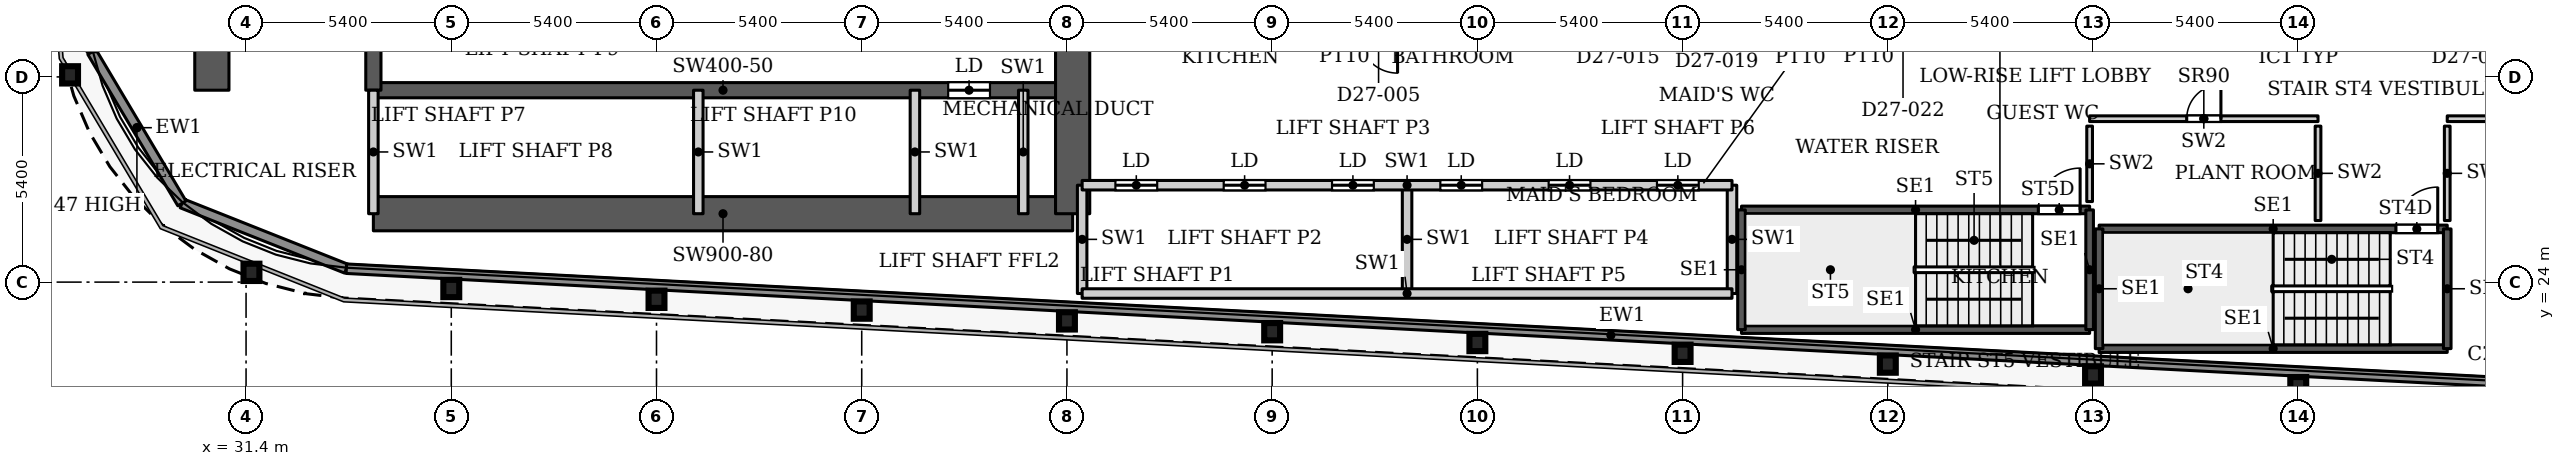
"""IFC4 building model, lengths in metres.
Left out: names, types, materials, properties, quantities, classifications, styles, units other than length and angle.
Written with IfcOpenShell. Run it as: python <this file> out.ifc"""

import sys

from ifc_helpers import new_model, si_unit, direction, frame, frame_2d, origin, origin_2d, place, context, subcontext, project, spatial, rectangle, i_section, extrude, source, transform, mapped, element, fill, save


model = new_model("IFC4")
c1 = context("Model", 3, precision=1e-05, world=origin(), true_north=direction((0.0, 1.0)))
c2 = subcontext(c1, "Body", "Model", "MODEL_VIEW")
j1 = project(units=[si_unit("LENGTHUNIT", "METRE"), si_unit("PLANEANGLEUNIT", "RADIAN")], contexts=[c1])
p1 = place(None, origin())
s1 = spatial("IfcSite", under=j1, at=p1, CompositionType="ELEMENT")
p2 = place(p1, origin())
s2 = spatial("IfcBuilding", under=s1, at=p2, CompositionType="ELEMENT")
p3 = place(p2, frame((0.0, 0.0, 121.4)))
s3 = spatial("IfcBuildingStorey", under=s2, at=p3, CompositionType="ELEMENT", Elevation=121.4)
for number, where, z_axis, x_axis in (
    (1, (85.4, 21.274, 0.0), (0.0, 0.0, 1.0), (1.0, 0.0, 0.0)),
    (2, (80.0, 21.558, 0.0), (0.0, 0.0, 1.0), (1.0, 0.0, 0.0)),
    (3, (74.6, 21.843, 0.0), (0.0, 0.0, 1.0), (1.0, 0.0, 0.0)),
    (4, (69.2, 22.127, 0.0), (0.0, 0.0, 1.0), (1.0, 0.0, 0.0)),
    (5, (63.8, 22.411, 0.0), (0.0, 0.0, 1.0), (1.0, 0.0, 0.0)),
    (6, (58.4, 22.695, 0.0), (0.0, 0.0, 1.0), (1.0, 0.0, 0.0)),
    (7, (53.0, 22.98, 0.0), (0.0, 0.0, 1.0), (1.0, 0.0, 0.0)),
    (8, (47.6, 23.264, 0.0), (0.0, 0.0, 1.0), (1.0, 0.0, 0.0)),
    (9, (42.2, 23.548, 0.0), (0.0, 0.0, 1.0), (1.0, 0.0, 0.0)),
    (10, (36.8, 23.832, 0.0), (0.0, 0.0, 1.0), (1.0, 0.0, 0.0)),
    (11, (31.542, 24.257, 0.0), (0.0, 0.0, 1.0), (1.0, 0.0, 0.0)),
    (12, (26.769, 29.454, 0.0), (0.0, 0.0, 1.0), (1.0, 0.0, 0.0)),
):
    element("IfcColumn", number, at=place(p3, frame(where, z_axis=z_axis, x_axis=x_axis)), inside=s3, PredefinedType="COLUMN", context=c2, shape_type="SweptSolid", body=[
        extrude(i_section(OverallWidth=0.418, OverallDepth=0.455, WebThickness=0.042, FlangeThickness=0.068, FilletRadius=0.014, at=origin_2d()), origin(), (0.0, 0.0, 1.0), 3.9),
    ])
p4 = place(p3, frame((34.75, 25.8, 0.0), z_axis=(0.0, 0.0, 1.0), x_axis=(1.0, 0.0, 0.0)))
e13 = element("IfcWall", 13, at=p4, inside=s3, PredefinedType="SHEAR", context=c2, shape_type="SweptSolid", body=[
    extrude(rectangle(XDim=18.4, YDim=0.9, at=frame_2d((9.2, 0.0))), origin(), (0.0, 0.0, 1.0), 3.9),
])
p5 = place(p3, frame((34.75, 29.05, 0.0), z_axis=(0.0, 0.0, 1.0), x_axis=(1.0, 0.0, 0.0)))
e14 = element("IfcWall", 14, at=p5, inside=s3, PredefinedType="SHEAR", context=c2, shape_type="SweptSolid", body=[
    extrude(rectangle(XDim=18.4, YDim=0.4, at=frame_2d((9.2, 0.0))), origin(), (0.0, 0.0, 1.0), 3.9),
])
p6 = place(p5, frame((15.125, 0.0, 0.0)))
e15 = element("IfcOpeningElement", 15, at=p6, cuts=e14, PredefinedType="OPENING", context=c2, shape_type="SweptSolid", body=[
    extrude(rectangle(XDim=1.1, YDim=2.2, at=frame_2d((0.55, 1.1))), frame((0.0, 0.21, 0.0), z_axis=(0.0, -1.0, 0.0), x_axis=(1.0, 0.0, 0.0)), (0.0, 0.0, 1.0), 0.42),
])
p7 = place(p3, frame((34.75, 29.05, 0.0), z_axis=(0.0, 0.0, 1.0), x_axis=(0.0, 1.0, 0.0)))
e16 = element("IfcWall", 16, at=p7, inside=s3, PredefinedType="SHEAR", context=c2, shape_type="SweptSolid", body=[
    extrude(rectangle(XDim=18.45, YDim=0.4, at=frame_2d((9.225, 0.0))), origin(), (0.0, 0.0, 1.0), 3.9),
])
p8 = place(p7, frame((8.025, 0.0, 0.0)))
e17 = element("IfcOpeningElement", 17, at=p8, cuts=e16, PredefinedType="OPENING", context=c2, shape_type="SweptSolid", body=[
    extrude(rectangle(XDim=1.1, YDim=2.2, at=frame_2d((0.55, 1.1))), frame((0.0, 0.21, 0.0), z_axis=(0.0, -1.0, 0.0), x_axis=(1.0, 0.0, 0.0)), (0.0, 0.0, 1.0), 0.42),
])
p9 = place(p7, frame((10.875, 0.0, 0.0)))
e18 = element("IfcOpeningElement", 18, at=p9, cuts=e16, PredefinedType="OPENING", context=c2, shape_type="SweptSolid", body=[
    extrude(rectangle(XDim=1.1, YDim=2.2, at=frame_2d((0.55, 1.1))), frame((0.0, 0.21, 0.0), z_axis=(0.0, -1.0, 0.0), x_axis=(1.0, 0.0, 0.0)), (0.0, 0.0, 1.0), 0.42),
])
p10 = place(p7, frame((13.725, 0.0, 0.0)))
e19 = element("IfcOpeningElement", 19, at=p10, cuts=e16, PredefinedType="OPENING", context=c2, shape_type="SweptSolid", body=[
    extrude(rectangle(XDim=1.1, YDim=2.2, at=frame_2d((0.55, 1.1))), frame((0.0, 0.21, 0.0), z_axis=(0.0, -1.0, 0.0), x_axis=(1.0, 0.0, 0.0)), (0.0, 0.0, 1.0), 0.42),
])
p11 = place(p7, frame((15.95, 0.0, 0.0)))
e20 = element("IfcOpeningElement", 20, at=p11, cuts=e16, PredefinedType="OPENING", context=c2, shape_type="SweptSolid", body=[
    extrude(rectangle(XDim=1.1, YDim=2.2, at=frame_2d((0.55, 1.1))), frame((0.0, 0.21, 0.0), z_axis=(0.0, -1.0, 0.0), x_axis=(1.0, 0.0, 0.0)), (0.0, 0.0, 1.0), 0.42),
])
p12 = place(p3, frame((30.5, 29.05, 0.0), z_axis=(0.0, 0.0, 1.0), x_axis=(0.0, 1.0, 0.0)))
e21 = element("IfcWall", 21, at=p12, inside=s3, PredefinedType="SHEAR", context=c2, shape_type="SweptSolid", body=[
    extrude(rectangle(XDim=18.45, YDim=0.9, at=frame_2d((9.225, 0.0))), origin(), (0.0, 0.0, 1.0), 3.9),
])
p13 = place(p12, frame((6.55, 0.0, 0.0)))
e22 = element("IfcOpeningElement", 22, at=p13, cuts=e21, PredefinedType="OPENING", context=c2, shape_type="SweptSolid", body=[
    extrude(rectangle(XDim=0.9, YDim=2.2, at=frame_2d((0.45, 1.1))), frame((0.0, 0.46, 0.0), z_axis=(0.0, -1.0, 0.0), x_axis=(1.0, 0.0, 0.0)), (0.0, 0.0, 1.0), 0.92),
])
p14 = place(p12, frame((11.025, 0.0, 0.0)))
e23 = element("IfcOpeningElement", 23, at=p14, cuts=e21, PredefinedType="OPENING", context=c2, shape_type="SweptSolid", body=[
    extrude(rectangle(XDim=0.9, YDim=2.2, at=frame_2d((0.45, 1.1))), frame((0.0, 0.46, 0.0), z_axis=(0.0, -1.0, 0.0), x_axis=(1.0, 0.0, 0.0)), (0.0, 0.0, 1.0), 0.92),
])
p15 = place(p3, frame((53.15, 25.8, 0.0), z_axis=(0.0, 0.0, 1.0), x_axis=(0.0, 1.0, 0.0)))
e24 = element("IfcWall", 24, at=p15, inside=s3, PredefinedType="SHEAR", context=c2, shape_type="SweptSolid", body=[
    extrude(rectangle(XDim=10.4, YDim=0.9, at=frame_2d((5.2, 0.0))), origin(), (0.0, 0.0, 1.0), 3.9),
])
p16 = place(p3, frame((34.039, 24.353, 0.0), z_axis=(0.0, 0.0, 1.0), x_axis=(-0.929352825399, 0.369192803184, 0.0)))
e25 = element("IfcWall", 25, at=p16, inside=s3, PredefinedType="SOLIDWALL", context=c2, shape_type="SweptSolid", body=[
    extrude(rectangle(XDim=4.656, YDim=0.25, at=frame_2d((2.328, 0.0))), origin(), (0.0, 0.0, 1.0), 3.75),
])
p17 = place(p3, frame((29.712, 26.072, 0.0), z_axis=(0.0, 0.0, 1.0), x_axis=(-0.511028049012, 0.859564036662, 0.0)))
e26 = element("IfcWall", 26, at=p17, inside=s3, PredefinedType="SOLIDWALL", context=c2, shape_type="SweptSolid", body=[
    extrude(rectangle(XDim=4.634, YDim=0.25, at=frame_2d((2.317, 0.0))), origin(), (0.0, 0.0, 1.0), 3.147),
])
p18 = place(p3, frame((27.344, 30.055, 0.0), z_axis=(0.0, 0.0, 1.0), x_axis=(-0.077571675317, 0.99698677784, 0.0)))
e27 = element("IfcWall", 27, at=p18, inside=s3, PredefinedType="SOLIDWALL", context=c2, shape_type="SweptSolid", body=[
    extrude(rectangle(XDim=1.92, YDim=0.25, at=frame_2d((0.96, 0.0))), origin(), (0.0, 0.0, 1.0), 3.75),
])
p19 = place(p3, frame((100.586, 20.85, 0.0), z_axis=(0.0, 0.0, 1.0), x_axis=(-0.99861746497, 0.052565755559, 0.0)))
e28 = element("IfcWall", 28, at=p19, inside=s3, PredefinedType="SOLIDWALL", context=c2, shape_type="SweptSolid", body=[
    extrude(rectangle(XDim=66.639, YDim=0.25, at=frame_2d((33.319, 0.0))), origin(), (0.0, 0.0, 1.0), 3.75),
])
p20 = place(p3, frame((80.16, 22.25, 0.0), z_axis=(0.0, 0.0, 1.0), x_axis=(1.0, 0.0, 0.0)))
e29 = element("IfcWall", 29, at=p20, inside=s3, PredefinedType="SHEAR", context=c2, shape_type="SweptSolid", body=[
    extrude(rectangle(XDim=9.16, YDim=0.2, at=frame_2d((4.58, 0.0))), origin(), (0.0, 0.0, 1.0), 3.9),
])
p21 = place(p3, frame((80.16, 25.4, 0.0), z_axis=(0.0, 0.0, 1.0), x_axis=(1.0, 0.0, 0.0)))
e30 = element("IfcWall", 30, at=p21, inside=s3, PredefinedType="SHEAR", context=c2, shape_type="SweptSolid", body=[
    extrude(rectangle(XDim=9.16, YDim=0.2, at=frame_2d((4.58, 0.0))), origin(), (0.0, 0.0, 1.0), 3.9),
])
p22 = place(p21, frame((7.81, 0.0, 0.0)))
e31 = element("IfcOpeningElement", 31, at=p22, cuts=e30, PredefinedType="OPENING", context=c2, shape_type="SweptSolid", body=[
    extrude(rectangle(XDim=1.1, YDim=2.2, at=frame_2d((0.55, 1.1))), frame((0.0, 0.11, 0.0), z_axis=(0.0, -1.0, 0.0), x_axis=(1.0, 0.0, 0.0)), (0.0, 0.0, 1.0), 0.22),
])
for number, where, z_axis, x_axis in (
    (32, (80.16, 22.25, 0.0), (0.0, 0.0, 1.0), (0.0, 1.0, 0.0)),
    (33, (89.32, 22.25, 0.0), (0.0, 0.0, 1.0), (0.0, 1.0, 0.0)),
):
    element("IfcWall", number, at=place(p3, frame(where, z_axis=z_axis, x_axis=x_axis)), inside=s3, PredefinedType="SHEAR", context=c2, shape_type="SweptSolid", body=[
        extrude(rectangle(XDim=3.15, YDim=0.2, at=frame_2d((1.575, 0.0))), origin(), (0.0, 0.0, 1.0), 3.9),
    ])
p23 = place(p3, frame((70.75, 22.75, 0.0), z_axis=(0.0, 0.0, 1.0), x_axis=(1.0, 0.0, 0.0)))
e34 = element("IfcWall", 34, at=p23, inside=s3, PredefinedType="SHEAR", context=c2, shape_type="SweptSolid", body=[
    extrude(rectangle(XDim=9.16, YDim=0.2, at=frame_2d((4.58, 0.0))), origin(), (0.0, 0.0, 1.0), 3.9),
])
p24 = place(p3, frame((70.75, 25.9, 0.0), z_axis=(0.0, 0.0, 1.0), x_axis=(1.0, 0.0, 0.0)))
e35 = element("IfcWall", 35, at=p24, inside=s3, PredefinedType="SHEAR", context=c2, shape_type="SweptSolid", body=[
    extrude(rectangle(XDim=9.16, YDim=0.2, at=frame_2d((4.58, 0.0))), origin(), (0.0, 0.0, 1.0), 3.9),
])
p25 = place(p24, frame((7.81, 0.0, 0.0)))
e36 = element("IfcOpeningElement", 36, at=p25, cuts=e35, PredefinedType="OPENING", context=c2, shape_type="SweptSolid", body=[
    extrude(rectangle(XDim=1.1, YDim=2.2, at=frame_2d((0.55, 1.1))), frame((0.0, 0.11, 0.0), z_axis=(0.0, -1.0, 0.0), x_axis=(1.0, 0.0, 0.0)), (0.0, 0.0, 1.0), 0.22),
])
for number, where, z_axis, x_axis in (
    (37, (70.75, 22.75, 0.0), (0.0, 0.0, 1.0), (0.0, 1.0, 0.0)),
    (38, (79.91, 22.75, 0.0), (0.0, 0.0, 1.0), (0.0, 1.0, 0.0)),
):
    element("IfcWall", number, at=place(p3, frame(where, z_axis=z_axis, x_axis=x_axis)), inside=s3, PredefinedType="SHEAR", context=c2, shape_type="SweptSolid", body=[
        extrude(rectangle(XDim=3.15, YDim=0.2, at=frame_2d((1.575, 0.0))), origin(), (0.0, 0.0, 1.0), 3.9),
    ])
for number, where, z_axis, x_axis in (
    (39, (34.75, 25.8, 0.0), (0.0, 0.0, 1.0), (0.0, 1.0, 0.0)),
    (40, (43.3, 25.8, 0.0), (0.0, 0.0, 1.0), (0.0, 1.0, 0.0)),
    (41, (49.0, 25.8, 0.0), (0.0, 0.0, 1.0), (0.0, 1.0, 0.0)),
    (42, (51.85, 25.8, 0.0), (0.0, 0.0, 1.0), (0.0, 1.0, 0.0)),
):
    element("IfcWall", number, at=place(p3, frame(where, z_axis=z_axis, x_axis=x_axis)), inside=s3, PredefinedType="PARTITIONING", context=c2, shape_type="SweptSolid", body=[
        extrude(rectangle(XDim=3.25, YDim=0.25, at=frame_2d((1.625, 0.0))), origin(), (0.0, 0.0, 1.0), 3.9),
    ])
for number, where, z_axis, x_axis in (
    (43, (53.4, 23.7, 0.0), (0.0, 0.0, 1.0), (0.0, 1.0, 0.0)),
    (44, (61.95, 23.7, 0.0), (0.0, 0.0, 1.0), (0.0, 1.0, 0.0)),
    (45, (70.5, 23.7, 0.0), (0.0, 0.0, 1.0), (0.0, 1.0, 0.0)),
):
    element("IfcWall", number, at=place(p3, frame(where, z_axis=z_axis, x_axis=x_axis)), inside=s3, PredefinedType="PARTITIONING", context=c2, shape_type="SweptSolid", body=[
        extrude(rectangle(XDim=2.85, YDim=0.25, at=frame_2d((1.425, 0.0))), origin(), (0.0, 0.0, 1.0), 3.9),
    ])
p26 = place(p3, frame((53.4, 23.7, 0.0), z_axis=(0.0, 0.0, 1.0), x_axis=(1.0, 0.0, 0.0)))
e46 = element("IfcWall", 46, at=p26, inside=s3, PredefinedType="PARTITIONING", context=c2, shape_type="SweptSolid", body=[
    extrude(rectangle(XDim=17.1, YDim=0.25, at=frame_2d((8.55, 0.0))), origin(), (0.0, 0.0, 1.0), 3.9),
])
p27 = place(p3, frame((53.4, 26.55, 0.0), z_axis=(0.0, 0.0, 1.0), x_axis=(1.0, 0.0, 0.0)))
e47 = element("IfcWall", 47, at=p27, inside=s3, PredefinedType="PARTITIONING", context=c2, shape_type="SweptSolid", body=[
    extrude(rectangle(XDim=17.1, YDim=0.25, at=frame_2d((8.55, 0.0))), origin(), (0.0, 0.0, 1.0), 3.9),
])
p28 = place(p27, frame((0.875, 0.0, 0.0)))
e48 = element("IfcOpeningElement", 48, at=p28, cuts=e47, PredefinedType="OPENING", context=c2, shape_type="SweptSolid", body=[
    extrude(rectangle(XDim=1.1, YDim=2.2, at=frame_2d((0.55, 1.1))), frame((0.0, 0.135, 0.0), z_axis=(0.0, -1.0, 0.0), x_axis=(1.0, 0.0, 0.0)), (0.0, 0.0, 1.0), 0.27),
])
p29 = place(p27, frame((3.725, 0.0, 0.0)))
e49 = element("IfcOpeningElement", 49, at=p29, cuts=e47, PredefinedType="OPENING", context=c2, shape_type="SweptSolid", body=[
    extrude(rectangle(XDim=1.1, YDim=2.2, at=frame_2d((0.55, 1.1))), frame((0.0, 0.135, 0.0), z_axis=(0.0, -1.0, 0.0), x_axis=(1.0, 0.0, 0.0)), (0.0, 0.0, 1.0), 0.27),
])
p30 = place(p27, frame((6.575, 0.0, 0.0)))
e50 = element("IfcOpeningElement", 50, at=p30, cuts=e47, PredefinedType="OPENING", context=c2, shape_type="SweptSolid", body=[
    extrude(rectangle(XDim=1.1, YDim=2.2, at=frame_2d((0.55, 1.1))), frame((0.0, 0.135, 0.0), z_axis=(0.0, -1.0, 0.0), x_axis=(1.0, 0.0, 0.0)), (0.0, 0.0, 1.0), 0.27),
])
p31 = place(p27, frame((9.425, 0.0, 0.0)))
e51 = element("IfcOpeningElement", 51, at=p31, cuts=e47, PredefinedType="OPENING", context=c2, shape_type="SweptSolid", body=[
    extrude(rectangle(XDim=1.1, YDim=2.2, at=frame_2d((0.55, 1.1))), frame((0.0, 0.135, 0.0), z_axis=(0.0, -1.0, 0.0), x_axis=(1.0, 0.0, 0.0)), (0.0, 0.0, 1.0), 0.27),
])
p32 = place(p27, frame((12.275, 0.0, 0.0)))
e52 = element("IfcOpeningElement", 52, at=p32, cuts=e47, PredefinedType="OPENING", context=c2, shape_type="SweptSolid", body=[
    extrude(rectangle(XDim=1.1, YDim=2.2, at=frame_2d((0.55, 1.1))), frame((0.0, 0.135, 0.0), z_axis=(0.0, -1.0, 0.0), x_axis=(1.0, 0.0, 0.0)), (0.0, 0.0, 1.0), 0.27),
])
p33 = place(p27, frame((15.125, 0.0, 0.0)))
e53 = element("IfcOpeningElement", 53, at=p33, cuts=e47, PredefinedType="OPENING", context=c2, shape_type="SweptSolid", body=[
    extrude(rectangle(XDim=1.1, YDim=2.2, at=frame_2d((0.55, 1.1))), frame((0.0, 0.135, 0.0), z_axis=(0.0, -1.0, 0.0), x_axis=(1.0, 0.0, 0.0)), (0.0, 0.0, 1.0), 0.27),
])
p34 = place(p3, frame((79.91, 28.3, 0.0), z_axis=(0.0, 0.0, 1.0), x_axis=(1.0, 0.0, 0.0)))
e54 = element("IfcWall", 54, at=p34, inside=s3, PredefinedType="PARTITIONING", context=c2, shape_type="SweptSolid", body=[
    extrude(rectangle(XDim=6.01, YDim=0.15, at=frame_2d((3.005, 0.0))), origin(), (0.0, 0.0, 1.0), 3.9),
])
p35 = place(p34, frame((2.555, 0.0, 0.0)))
e55 = element("IfcOpeningElement", 55, at=p35, cuts=e54, PredefinedType="OPENING", context=c2, shape_type="SweptSolid", body=[
    extrude(rectangle(XDim=0.9, YDim=2.2, at=frame_2d((0.45, 1.1))), frame((0.0, 0.085, 0.0), z_axis=(0.0, -1.0, 0.0), x_axis=(1.0, 0.0, 0.0)), (0.0, 0.0, 1.0), 0.17),
])
p36 = place(p3, frame((79.91, 26.12, 0.0), z_axis=(0.0, 0.0, 1.0), x_axis=(0.0, 1.0, 0.0)))
e56 = element("IfcWall", 56, at=p36, inside=s3, PredefinedType="PARTITIONING", context=c2, shape_type="SweptSolid", body=[
    extrude(rectangle(XDim=1.985, YDim=0.15, at=frame_2d((0.992, 0.0))), origin(), (0.0, 0.0, 1.0), 3.9),
])
p37 = place(p3, frame((85.92, 25.62, 0.0), z_axis=(0.0, 0.0, 1.0), x_axis=(0.0, 1.0, 0.0)))
e57 = element("IfcWall", 57, at=p37, inside=s3, PredefinedType="PARTITIONING", context=c2, shape_type="SweptSolid", body=[
    extrude(rectangle(XDim=2.485, YDim=0.15, at=frame_2d((1.242, 0.0))), origin(), (0.0, 0.0, 1.0), 3.9),
])
p38 = place(p3, frame((89.32, 28.3, 0.0), z_axis=(0.0, 0.0, 1.0), x_axis=(1.0, 0.0, 0.0)))
e58 = element("IfcWall", 58, at=p38, inside=s3, PredefinedType="PARTITIONING", context=c2, shape_type="SweptSolid", body=[
    extrude(rectangle(XDim=10.578, YDim=0.15, at=frame_2d((5.289, 0.0))), origin(), (0.0, 0.0, 1.0), 2.5),
])
p39 = place(p38, frame((3.89, 0.0, 0.0)))
e59 = element("IfcOpeningElement", 59, at=p39, cuts=e58, PredefinedType="OPENING", context=c2, shape_type="SweptSolid", body=[
    extrude(rectangle(XDim=0.9, YDim=2.2, at=frame_2d((0.45, 1.1))), frame((0.0, 0.085, 0.0), z_axis=(0.0, -1.0, 0.0), x_axis=(1.0, 0.0, 0.0)), (0.0, 0.0, 1.0), 0.17),
])
p40 = place(p3, frame((89.32, 25.62, 0.0), z_axis=(0.0, 0.0, 1.0), x_axis=(0.0, 1.0, 0.0)))
e60 = element("IfcWall", 60, at=p40, inside=s3, PredefinedType="PARTITIONING", context=c2, shape_type="SweptSolid", body=[
    extrude(rectangle(XDim=2.485, YDim=0.15, at=frame_2d((1.242, 0.0))), origin(), (0.0, 0.0, 1.0), 3.9),
])
m1 = source(origin(), c2, "Body", "SweptSolid", [
    extrude(rectangle(XDim=1.1, YDim=2.2, at=frame_2d((0.55, 1.1))), frame((0.0, 0.025, 0.0), z_axis=(0.0, -1.0, 0.0), x_axis=(1.0, 0.0, 0.0)), (0.0, 0.0, 1.0), 0.05),
])
p41 = place(p28, origin())
e61 = element("IfcDoor", 61, at=p41, inside=s3, OperationType="SLIDING_TO_LEFT", PredefinedType="DOOR", context=c2, shape_type="MappedRepresentation", body=[
    mapped(m1, transform((0.0, 0.0, 0.0), x_axis=(1.0, 0.0, 0.0), y_axis=(0.0, 1.0, 0.0), z_axis=(0.0, 0.0, 1.0), scale=1.0)),
])
fill(e48, e61)
p42 = place(p29, origin())
e62 = element("IfcDoor", 62, at=p42, inside=s3, OperationType="SLIDING_TO_LEFT", PredefinedType="DOOR", context=c2, shape_type="MappedRepresentation", body=[
    mapped(m1, transform((0.0, 0.0, 0.0), x_axis=(1.0, 0.0, 0.0), y_axis=(0.0, 1.0, 0.0), z_axis=(0.0, 0.0, 1.0), scale=1.0)),
])
fill(e49, e62)
p43 = place(p30, origin())
e63 = element("IfcDoor", 63, at=p43, inside=s3, OperationType="SLIDING_TO_LEFT", PredefinedType="DOOR", context=c2, shape_type="MappedRepresentation", body=[
    mapped(m1, transform((0.0, 0.0, 0.0), x_axis=(1.0, 0.0, 0.0), y_axis=(0.0, 1.0, 0.0), z_axis=(0.0, 0.0, 1.0), scale=1.0)),
])
fill(e50, e63)
p44 = place(p31, origin())
e64 = element("IfcDoor", 64, at=p44, inside=s3, OperationType="SLIDING_TO_LEFT", PredefinedType="DOOR", context=c2, shape_type="MappedRepresentation", body=[
    mapped(m1, transform((0.0, 0.0, 0.0), x_axis=(1.0, 0.0, 0.0), y_axis=(0.0, 1.0, 0.0), z_axis=(0.0, 0.0, 1.0), scale=1.0)),
])
fill(e51, e64)
p45 = place(p32, origin())
e65 = element("IfcDoor", 65, at=p45, inside=s3, OperationType="SLIDING_TO_LEFT", PredefinedType="DOOR", context=c2, shape_type="MappedRepresentation", body=[
    mapped(m1, transform((0.0, 0.0, 0.0), x_axis=(1.0, 0.0, 0.0), y_axis=(0.0, 1.0, 0.0), z_axis=(0.0, 0.0, 1.0), scale=1.0)),
])
fill(e52, e65)
p46 = place(p33, origin())
e66 = element("IfcDoor", 66, at=p46, inside=s3, OperationType="SLIDING_TO_LEFT", PredefinedType="DOOR", context=c2, shape_type="MappedRepresentation", body=[
    mapped(m1, transform((0.0, 0.0, 0.0), x_axis=(1.0, 0.0, 0.0), y_axis=(0.0, 1.0, 0.0), z_axis=(0.0, 0.0, 1.0), scale=1.0)),
])
fill(e53, e66)
p47 = place(p6, origin())
e67 = element("IfcDoor", 67, at=p47, inside=s3, OperationType="SLIDING_TO_LEFT", PredefinedType="DOOR", context=c2, shape_type="MappedRepresentation", body=[
    mapped(m1, transform((0.0, 0.0, 0.0), x_axis=(1.0, 0.0, 0.0), y_axis=(0.0, 1.0, 0.0), z_axis=(0.0, 0.0, 1.0), scale=1.0)),
])
fill(e15, e67)
m2 = source(origin(), c2, "Body", "SweptSolid", [
    extrude(rectangle(XDim=0.9, YDim=2.2, at=frame_2d((0.45, 1.1))), frame((0.0, 0.025, 0.0), z_axis=(0.0, -1.0, 0.0), x_axis=(1.0, 0.0, 0.0)), (0.0, 0.0, 1.0), 0.05),
])
p48 = place(p35, origin())
e68 = element("IfcDoor", 68, at=p48, inside=s3, OperationType="SINGLE_SWING_LEFT", PredefinedType="DOOR", context=c2, shape_type="MappedRepresentation", body=[
    mapped(m2, transform((0.0, 0.0, 0.0), x_axis=(1.0, 0.0, 0.0), y_axis=(0.0, 1.0, 0.0), z_axis=(0.0, 0.0, 1.0), scale=1.0)),
])
fill(e55, e68)
m3 = source(origin(), c2, "Body", "SweptSolid", [
    extrude(rectangle(XDim=1.1, YDim=2.2, at=frame_2d((0.55, 1.1))), frame((0.0, 0.025, 0.0), z_axis=(0.0, -1.0, 0.0), x_axis=(1.0, 0.0, 0.0)), (0.0, 0.0, 1.0), 0.05),
])
p49 = place(p22, origin())
e69 = element("IfcDoor", 69, at=p49, inside=s3, OperationType="SINGLE_SWING_LEFT", PredefinedType="DOOR", context=c2, shape_type="MappedRepresentation", body=[
    mapped(m3, transform((0.0, 0.0, 0.0), x_axis=(1.0, 0.0, 0.0), y_axis=(0.0, 1.0, 0.0), z_axis=(0.0, 0.0, 1.0), scale=1.0)),
])
fill(e31, e69)
p50 = place(p25, origin())
e70 = element("IfcDoor", 70, at=p50, inside=s3, OperationType="SINGLE_SWING_LEFT", PredefinedType="DOOR", context=c2, shape_type="MappedRepresentation", body=[
    mapped(m3, transform((0.0, 0.0, 0.0), x_axis=(1.0, 0.0, 0.0), y_axis=(0.0, 1.0, 0.0), z_axis=(0.0, 0.0, 1.0), scale=1.0)),
])
fill(e36, e70)
save(model, sys.argv[1])
